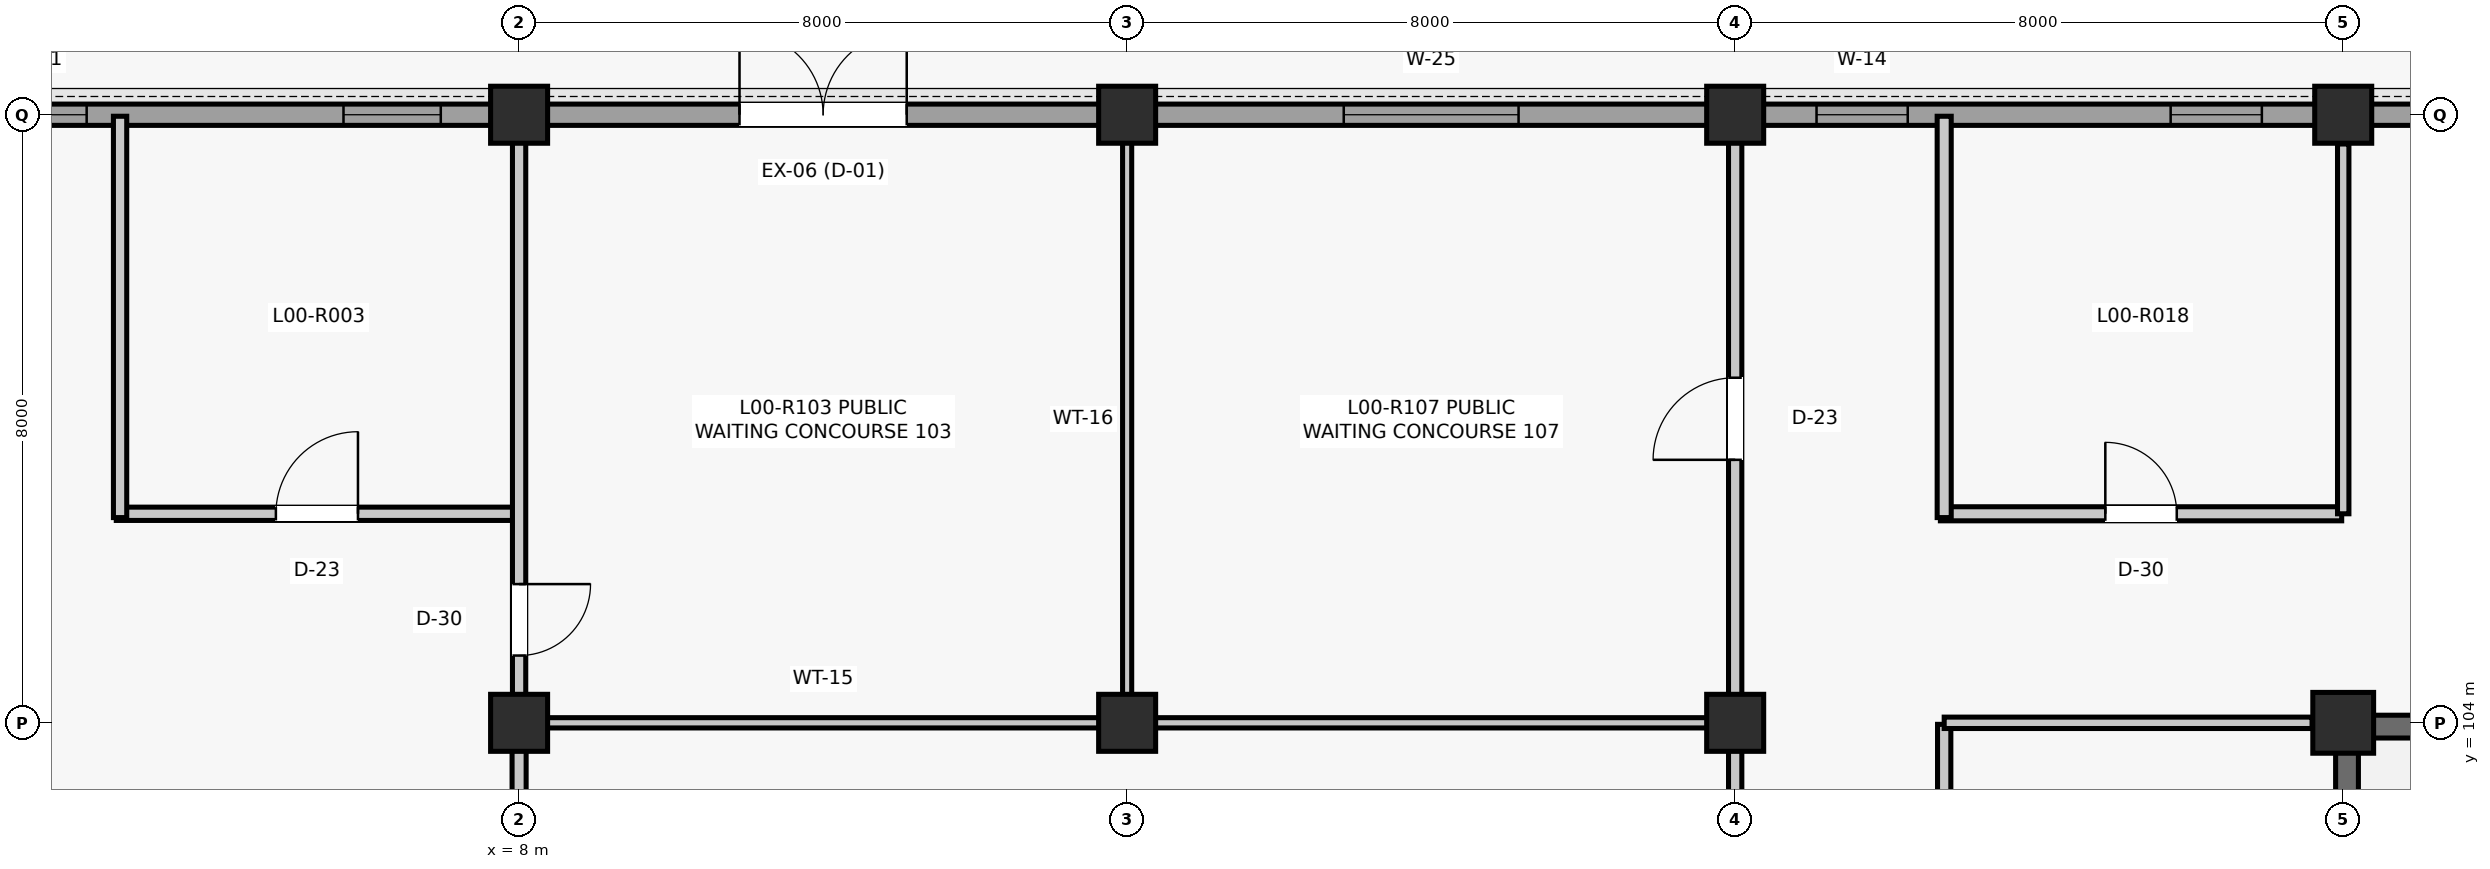
"""IFC4 building model, lengths in metres.
Left out: names, types, materials, properties, quantities, classifications, styles, units other than length and angle.
Written with IfcOpenShell. Run it as: python <this file> out.ifc"""

import sys

from ifc_helpers import new_model, si_unit, direction, frame, frame_2d, origin, origin_2d, place, context, subcontext, project, spatial, rectangle, extrude, element, fill, save


model = new_model("IFC4")
c1 = context("Model", 3, precision=1e-05, world=origin(), true_north=direction((0.0, 1.0)))
c2 = subcontext(c1, "Body", "Model", "MODEL_VIEW")
j1 = project(units=[si_unit("LENGTHUNIT", "METRE"), si_unit("PLANEANGLEUNIT", "RADIAN")], contexts=[c1])
p1 = place(None, origin())
s1 = spatial("IfcSite", under=j1, at=p1, CompositionType="ELEMENT")
p2 = place(p1, origin())
s2 = spatial("IfcBuilding", under=s1, at=p2, CompositionType="ELEMENT")
p3 = place(p2, origin())
s3 = spatial("IfcBuildingStorey", under=s2, at=p3, CompositionType="ELEMENT", Elevation=0.0)
for number, where, z_axis, x_axis in (
    (1, (8.0, 104.0, 0.0), (0.0, 0.0, 1.0), (1.0, 0.0, 0.0)),
    (2, (8.0, 112.0, 0.0), (0.0, 0.0, 1.0), (1.0, 0.0, 0.0)),
    (3, (16.0, 104.0, 0.0), (0.0, 0.0, 1.0), (1.0, 0.0, 0.0)),
    (4, (16.0, 112.0, 0.0), (0.0, 0.0, 1.0), (1.0, 0.0, 0.0)),
    (5, (24.0, 104.0, 0.0), (0.0, 0.0, 1.0), (1.0, 0.0, 0.0)),
    (6, (24.0, 112.0, 0.0), (0.0, 0.0, 1.0), (1.0, 0.0, 0.0)),
):
    element("IfcColumn", number, at=place(p3, frame(where, z_axis=z_axis, x_axis=x_axis)), inside=s3, PredefinedType="COLUMN", context=c2, shape_type="SweptSolid", body=[
        extrude(rectangle(XDim=0.75, YDim=0.75, at=origin_2d()), origin(), (0.0, 0.0, 1.0), 5.28),
    ])
p4 = place(p3, frame((32.0, 104.0, 0.0), z_axis=(0.0, 0.0, 1.0), x_axis=(1.0, 0.0, 0.0)))
e7 = element("IfcColumn", 7, at=p4, inside=s3, PredefinedType="COLUMN", context=c2, shape_type="SweptSolid", body=[
    extrude(rectangle(XDim=0.8, YDim=0.8, at=origin_2d()), origin(), (0.0, 0.0, 1.0), 5.28),
])
p5 = place(p3, frame((32.0, 112.0, 0.0), z_axis=(0.0, 0.0, 1.0), x_axis=(1.0, 0.0, 0.0)))
e8 = element("IfcColumn", 8, at=p5, inside=s3, PredefinedType="COLUMN", context=c2, shape_type="SweptSolid", body=[
    extrude(rectangle(XDim=0.75, YDim=0.75, at=origin_2d()), origin(), (0.0, 0.0, 1.0), 5.28),
])
p6 = place(p3, frame((0.36, 112.0, 0.0), z_axis=(0.0, 0.0, 1.0), x_axis=(1.0, 0.0, 0.0)))
e9 = element("IfcWall", 9, at=p6, inside=s3, PredefinedType="SOLIDWALL", context=c2, shape_type="SweptSolid", body=[
    extrude(rectangle(XDim=7.28, YDim=0.28, at=frame_2d((3.64, 0.0))), origin(), (0.0, 0.0, 1.0), 4.614),
])
p7 = place(p6, frame((0.67, 0.0, 0.95)))
e10 = element("IfcOpeningElement", 10, at=p7, cuts=e9, PredefinedType="OPENING", context=c2, shape_type="SweptSolid", body=[
    extrude(rectangle(XDim=1.28, YDim=1.72, at=frame_2d((0.64, 0.86))), frame((0.0, 0.15, 0.0), z_axis=(0.0, -1.0, 0.0), x_axis=(1.0, 0.0, 0.0)), (0.0, 0.0, 1.0), 0.3),
])
p8 = place(p6, frame((5.33, 0.0, 0.95)))
e11 = element("IfcOpeningElement", 11, at=p8, cuts=e9, PredefinedType="OPENING", context=c2, shape_type="SweptSolid", body=[
    extrude(rectangle(XDim=1.28, YDim=1.72, at=frame_2d((0.64, 0.86))), frame((0.0, 0.15, 0.0), z_axis=(0.0, -1.0, 0.0), x_axis=(1.0, 0.0, 0.0)), (0.0, 0.0, 1.0), 0.3),
])
p9 = place(p3, frame((8.36, 112.0, 0.0), z_axis=(0.0, 0.0, 1.0), x_axis=(1.0, 0.0, 0.0)))
e12 = element("IfcWall", 12, at=p9, inside=s3, PredefinedType="SOLIDWALL", context=c2, shape_type="SweptSolid", body=[
    extrude(rectangle(XDim=7.28, YDim=0.28, at=frame_2d((3.64, 0.0))), origin(), (0.0, 0.0, 1.0), 4.677),
])
p10 = place(p9, frame((2.54, 0.0, 0.0)))
e13 = element("IfcOpeningElement", 13, at=p10, cuts=e12, PredefinedType="OPENING", context=c2, shape_type="SweptSolid", body=[
    extrude(rectangle(XDim=2.2, YDim=2.5, at=frame_2d((1.1, 1.25))), frame((0.0, 0.15, 0.0), z_axis=(0.0, -1.0, 0.0), x_axis=(1.0, 0.0, 0.0)), (0.0, 0.0, 1.0), 0.3),
])
p11 = place(p3, frame((16.36, 112.0, 0.0), z_axis=(0.0, 0.0, 1.0), x_axis=(1.0, 0.0, 0.0)))
e14 = element("IfcWall", 14, at=p11, inside=s3, PredefinedType="SOLIDWALL", context=c2, shape_type="SweptSolid", body=[
    extrude(rectangle(XDim=7.28, YDim=0.28, at=frame_2d((3.64, 0.0))), origin(), (0.0, 0.0, 1.0), 4.61),
])
p12 = place(p11, frame((2.49, 0.0, 0.9)))
e15 = element("IfcOpeningElement", 15, at=p12, cuts=e14, PredefinedType="OPENING", context=c2, shape_type="SweptSolid", body=[
    extrude(rectangle(XDim=2.3, YDim=2.55, at=frame_2d((1.15, 1.275))), frame((0.0, 0.15, 0.0), z_axis=(0.0, -1.0, 0.0), x_axis=(1.0, 0.0, 0.0)), (0.0, 0.0, 1.0), 0.3),
])
p13 = place(p3, frame((24.36, 112.0, 0.0), z_axis=(0.0, 0.0, 1.0), x_axis=(1.0, 0.0, 0.0)))
e16 = element("IfcWall", 16, at=p13, inside=s3, PredefinedType="SOLIDWALL", context=c2, shape_type="SweptSolid", body=[
    extrude(rectangle(XDim=7.28, YDim=0.28, at=frame_2d((3.64, 0.0))), origin(), (0.0, 0.0, 1.0), 4.674),
])
p14 = place(p13, frame((0.71, 0.0, 0.95)))
e17 = element("IfcOpeningElement", 17, at=p14, cuts=e16, PredefinedType="OPENING", context=c2, shape_type="SweptSolid", body=[
    extrude(rectangle(XDim=1.2, YDim=1.8, at=frame_2d((0.6, 0.9))), frame((0.0, 0.15, 0.0), z_axis=(0.0, -1.0, 0.0), x_axis=(1.0, 0.0, 0.0)), (0.0, 0.0, 1.0), 0.3),
])
p15 = place(p13, frame((5.37, 0.0, 0.95)))
e18 = element("IfcOpeningElement", 18, at=p15, cuts=e16, PredefinedType="OPENING", context=c2, shape_type="SweptSolid", body=[
    extrude(rectangle(XDim=1.2, YDim=1.8, at=frame_2d((0.6, 0.9))), frame((0.0, 0.15, 0.0), z_axis=(0.0, -1.0, 0.0), x_axis=(1.0, 0.0, 0.0)), (0.0, 0.0, 1.0), 0.3),
])
p16 = place(p3, frame((32.36, 112.0, 0.0), z_axis=(0.0, 0.0, 1.0), x_axis=(1.0, 0.0, 0.0)))
e19 = element("IfcWall", 19, at=p16, inside=s3, PredefinedType="SOLIDWALL", context=c2, shape_type="SweptSolid", body=[
    extrude(rectangle(XDim=7.28, YDim=0.28, at=frame_2d((3.64, 0.0))), origin(), (0.0, 0.0, 1.0), 4.614),
])
p17 = place(p16, frame((2.54, 0.0, 0.0)))
e20 = element("IfcOpeningElement", 20, at=p17, cuts=e19, PredefinedType="OPENING", context=c2, shape_type="SweptSolid", body=[
    extrude(rectangle(XDim=2.2, YDim=2.5, at=frame_2d((1.1, 1.25))), frame((0.0, 0.15, 0.0), z_axis=(0.0, -1.0, 0.0), x_axis=(1.0, 0.0, 0.0)), (0.0, 0.0, 1.0), 0.3),
])
for number, where, z_axis, x_axis in (
    (21, (32.05, 96.29, 0.0), (0.0, 0.0, 1.0), (0.0, 1.0, 0.0)),
    (22, (32.29, 103.95, 0.0), (0.0, 0.0, 1.0), (1.0, 0.0, 0.0)),
):
    element("IfcWall", number, at=place(p3, frame(where, z_axis=z_axis, x_axis=x_axis)), inside=s3, PredefinedType="SHEAR", context=c2, shape_type="SweptSolid", body=[
        extrude(rectangle(XDim=7.42, YDim=0.3, at=frame_2d((3.71, 0.0))), origin(), (0.0, 0.0, 1.0), 5.035),
    ])
p18 = place(p3, frame((2.7, 106.75, 0.0), z_axis=(0.0, 0.0, 1.0), x_axis=(1.0, 0.0, 0.0)))
e23 = element("IfcWall", 23, at=p18, inside=s3, PredefinedType="PARTITIONING", context=c2, shape_type="SweptSolid", body=[
    extrude(rectangle(XDim=5.28, YDim=0.175, at=frame_2d((2.64, 0.0))), origin(), (0.0, 0.0, 1.0), 4.404),
])
p19 = place(p18, frame((2.1, 0.0, 0.0)))
e24 = element("IfcOpeningElement", 24, at=p19, cuts=e23, PredefinedType="OPENING", context=c2, shape_type="SweptSolid", body=[
    extrude(rectangle(XDim=1.08, YDim=2.2, at=frame_2d((0.54, 1.1))), frame((0.0, 0.097, 0.0), z_axis=(0.0, -1.0, 0.0), x_axis=(1.0, 0.0, 0.0)), (0.0, 0.0, 1.0), 0.195),
])
p20 = place(p3, frame((2.75, 106.7, 0.0), z_axis=(0.0, 0.0, 1.0), x_axis=(0.0, 1.0, 0.0)))
e25 = element("IfcWall", 25, at=p20, inside=s3, PredefinedType="PARTITIONING", context=c2, shape_type="SweptSolid", body=[
    extrude(rectangle(XDim=5.28, YDim=0.175, at=frame_2d((2.64, 0.0))), origin(), (0.0, 0.0, 1.0), 4.607),
])
p21 = place(p3, frame((26.75, 96.02, 0.0), z_axis=(0.0, 0.0, 1.0), x_axis=(0.0, 1.0, 0.0)))
e26 = element("IfcWall", 26, at=p21, inside=s3, PredefinedType="PARTITIONING", context=c2, shape_type="SweptSolid", body=[
    extrude(rectangle(XDim=7.96, YDim=0.175, at=frame_2d((3.98, 0.0))), origin(), (0.0, 0.0, 1.0), 4.327),
])
p22 = place(p21, frame((3.355, 0.0, 0.0)))
e27 = element("IfcOpeningElement", 27, at=p22, cuts=e26, PredefinedType="OPENING", context=c2, shape_type="SweptSolid", body=[
    extrude(rectangle(XDim=1.25, YDim=2.18, at=frame_2d((0.625, 1.09))), frame((0.0, 0.097, 0.0), z_axis=(0.0, -1.0, 0.0), x_axis=(1.0, 0.0, 0.0)), (0.0, 0.0, 1.0), 0.195),
])
p23 = place(p3, frame((26.75, 104.0, 0.0), z_axis=(0.0, 0.0, 1.0), x_axis=(1.0, 0.0, 0.0)))
e28 = element("IfcWall", 28, at=p23, inside=s3, PredefinedType="PARTITIONING", context=c2, shape_type="SweptSolid", body=[
    extrude(rectangle(XDim=4.84, YDim=0.15, at=frame_2d((2.42, 0.0))), origin(), (0.0, 0.0, 1.0), 4.327),
])
p24 = place(p3, frame((26.7, 106.75, 0.0), z_axis=(0.0, 0.0, 1.0), x_axis=(1.0, 0.0, 0.0)))
e29 = element("IfcWall", 29, at=p24, inside=s3, PredefinedType="PARTITIONING", context=c2, shape_type="SweptSolid", body=[
    extrude(rectangle(XDim=5.28, YDim=0.185, at=frame_2d((2.64, 0.0))), origin(), (0.0, 0.0, 1.0), 4.412),
])
p25 = place(p24, frame((2.17, 0.0, 0.0)))
e30 = element("IfcOpeningElement", 30, at=p25, cuts=e29, PredefinedType="OPENING", context=c2, shape_type="SweptSolid", body=[
    extrude(rectangle(XDim=0.94, YDim=2.12, at=frame_2d((0.47, 1.06))), frame((0.0, 0.103, 0.0), z_axis=(0.0, -1.0, 0.0), x_axis=(1.0, 0.0, 0.0)), (0.0, 0.0, 1.0), 0.205),
])
p26 = place(p3, frame((26.75, 106.7, 0.0), z_axis=(0.0, 0.0, 1.0), x_axis=(0.0, 1.0, 0.0)))
e31 = element("IfcWall", 31, at=p26, inside=s3, PredefinedType="PARTITIONING", context=c2, shape_type="SweptSolid", body=[
    extrude(rectangle(XDim=5.28, YDim=0.185, at=frame_2d((2.64, 0.0))), origin(), (0.0, 0.0, 1.0), 4.667),
])
p27 = place(p3, frame((32.0, 106.75, 0.0), z_axis=(0.0, 0.0, 1.0), x_axis=(0.0, 1.0, 0.0)))
e32 = element("IfcWall", 32, at=p27, inside=s3, PredefinedType="PARTITIONING", context=c2, shape_type="SweptSolid", body=[
    extrude(rectangle(XDim=4.865, YDim=0.15, at=frame_2d((2.433, 0.0))), origin(), (0.0, 0.0, 1.0), 4.412),
])
p28 = place(p3, frame((8.0, 96.39, 0.0), z_axis=(0.0, 0.0, 1.0), x_axis=(0.0, 1.0, 0.0)))
e33 = element("IfcWall", 33, at=p28, inside=s3, PredefinedType="PARTITIONING", context=c2, shape_type="SweptSolid", body=[
    extrude(rectangle(XDim=7.245, YDim=0.185, at=frame_2d((3.623, 0.0))), origin(), (0.0, 0.0, 1.0), 4.412),
])
p29 = place(p28, frame((2.972, 0.0, 0.0)))
e34 = element("IfcOpeningElement", 34, at=p29, cuts=e33, PredefinedType="OPENING", context=c2, shape_type="SweptSolid", body=[
    extrude(rectangle(XDim=1.3, YDim=2.2, at=frame_2d((0.65, 1.1))), frame((0.0, 0.103, 0.0), z_axis=(0.0, -1.0, 0.0), x_axis=(1.0, 0.0, 0.0)), (0.0, 0.0, 1.0), 0.205),
])
p30 = place(p3, frame((8.0, 104.365, 0.0), z_axis=(0.0, 0.0, 1.0), x_axis=(0.0, 1.0, 0.0)))
e35 = element("IfcWall", 35, at=p30, inside=s3, PredefinedType="PARTITIONING", context=c2, shape_type="SweptSolid", body=[
    extrude(rectangle(XDim=7.27, YDim=0.175, at=frame_2d((3.635, 0.0))), origin(), (0.0, 0.0, 1.0), 4.404),
])
p31 = place(p30, frame((0.52, 0.0, 0.0)))
e36 = element("IfcOpeningElement", 36, at=p31, cuts=e35, PredefinedType="OPENING", context=c2, shape_type="SweptSolid", body=[
    extrude(rectangle(XDim=0.94, YDim=2.12, at=frame_2d((0.47, 1.06))), frame((0.0, 0.097, 0.0), z_axis=(0.0, -1.0, 0.0), x_axis=(1.0, 0.0, 0.0)), (0.0, 0.0, 1.0), 0.195),
])
p32 = place(p3, frame((8.365, 104.0, 0.0), z_axis=(0.0, 0.0, 1.0), x_axis=(1.0, 0.0, 0.0)))
e37 = element("IfcWall", 37, at=p32, inside=s3, PredefinedType="PARTITIONING", context=c2, shape_type="SweptSolid", body=[
    extrude(rectangle(XDim=7.27, YDim=0.135, at=frame_2d((3.635, 0.0))), origin(), (0.0, 0.0, 1.0), 4.336),
])
p33 = place(p3, frame((16.0, 104.365, 0.0), z_axis=(0.0, 0.0, 1.0), x_axis=(0.0, 1.0, 0.0)))
e38 = element("IfcWall", 38, at=p33, inside=s3, PredefinedType="PARTITIONING", context=c2, shape_type="SweptSolid", body=[
    extrude(rectangle(XDim=7.27, YDim=0.12, at=frame_2d((3.635, 0.0))), origin(), (0.0, 0.0, 1.0), 4.471),
])
p34 = place(p3, frame((24.0, 96.365, 0.0), z_axis=(0.0, 0.0, 1.0), x_axis=(0.0, 1.0, 0.0)))
e39 = element("IfcWall", 39, at=p34, inside=s3, PredefinedType="PARTITIONING", context=c2, shape_type="SweptSolid", body=[
    extrude(rectangle(XDim=7.27, YDim=0.175, at=frame_2d((3.635, 0.0))), origin(), (0.0, 0.0, 1.0), 4.471),
])
p35 = place(p34, frame((2.685, 0.0, 0.0)))
e40 = element("IfcOpeningElement", 40, at=p35, cuts=e39, PredefinedType="OPENING", context=c2, shape_type="SweptSolid", body=[
    extrude(rectangle(XDim=1.9, YDim=2.38, at=frame_2d((0.95, 1.19))), frame((0.0, 0.097, 0.0), z_axis=(0.0, -1.0, 0.0), x_axis=(1.0, 0.0, 0.0)), (0.0, 0.0, 1.0), 0.195),
])
p36 = place(p3, frame((16.365, 104.0, 0.0), z_axis=(0.0, 0.0, 1.0), x_axis=(1.0, 0.0, 0.0)))
e41 = element("IfcWall", 41, at=p36, inside=s3, PredefinedType="PARTITIONING", context=c2, shape_type="SweptSolid", body=[
    extrude(rectangle(XDim=7.27, YDim=0.135, at=frame_2d((3.635, 0.0))), origin(), (0.0, 0.0, 1.0), 4.404),
])
p37 = place(p3, frame((24.0, 104.365, 0.0), z_axis=(0.0, 0.0, 1.0), x_axis=(0.0, 1.0, 0.0)))
e42 = element("IfcWall", 42, at=p37, inside=s3, PredefinedType="PARTITIONING", context=c2, shape_type="SweptSolid", body=[
    extrude(rectangle(XDim=7.27, YDim=0.175, at=frame_2d((3.635, 0.0))), origin(), (0.0, 0.0, 1.0), 4.403),
])
p38 = place(p37, frame((3.095, 0.0, 0.0)))
e43 = element("IfcOpeningElement", 43, at=p38, cuts=e42, PredefinedType="OPENING", context=c2, shape_type="SweptSolid", body=[
    extrude(rectangle(XDim=1.08, YDim=2.2, at=frame_2d((0.54, 1.1))), frame((0.0, 0.097, 0.0), z_axis=(0.0, -1.0, 0.0), x_axis=(1.0, 0.0, 0.0)), (0.0, 0.0, 1.0), 0.195),
])
p39 = place(p7, origin())
e44 = element("IfcWindow", 44, at=p39, inside=s3, PartitioningType="SINGLE_PANEL", PredefinedType="WINDOW", context=c2, shape_type="SweptSolid", body=[
    extrude(rectangle(XDim=1.28, YDim=1.72, at=frame_2d((0.64, 0.86))), frame((0.0, 0.03, 0.0), z_axis=(0.0, -1.0, 0.0), x_axis=(1.0, 0.0, 0.0)), (0.0, 0.0, 1.0), 0.06),
])
fill(e10, e44)
p40 = place(p8, origin())
e45 = element("IfcWindow", 45, at=p40, inside=s3, PartitioningType="SINGLE_PANEL", PredefinedType="WINDOW", context=c2, shape_type="SweptSolid", body=[
    extrude(rectangle(XDim=1.28, YDim=1.72, at=frame_2d((0.64, 0.86))), frame((0.0, 0.03, 0.0), z_axis=(0.0, -1.0, 0.0), x_axis=(1.0, 0.0, 0.0)), (0.0, 0.0, 1.0), 0.06),
])
fill(e11, e45)
p41 = place(p10, origin())
e46 = element("IfcDoor", 46, at=p41, inside=s3, OperationType="DOUBLE_DOOR_SINGLE_SWING", PredefinedType="DOOR", context=c2, shape_type="SweptSolid", body=[
    extrude(rectangle(XDim=2.2, YDim=2.5, at=frame_2d((1.1, 1.25))), frame((0.0, 0.025, 0.0), z_axis=(0.0, -1.0, 0.0), x_axis=(1.0, 0.0, 0.0)), (0.0, 0.0, 1.0), 0.05),
])
fill(e13, e46)
p42 = place(p12, origin())
e47 = element("IfcWindow", 47, at=p42, inside=s3, PartitioningType="SINGLE_PANEL", PredefinedType="WINDOW", context=c2, shape_type="SweptSolid", body=[
    extrude(rectangle(XDim=2.3, YDim=2.55, at=frame_2d((1.15, 1.275))), frame((0.0, 0.03, 0.0), z_axis=(0.0, -1.0, 0.0), x_axis=(1.0, 0.0, 0.0)), (0.0, 0.0, 1.0), 0.06),
])
fill(e15, e47)
p43 = place(p14, origin())
e48 = element("IfcWindow", 48, at=p43, inside=s3, PartitioningType="SINGLE_PANEL", PredefinedType="WINDOW", context=c2, shape_type="SweptSolid", body=[
    extrude(rectangle(XDim=1.2, YDim=1.8, at=frame_2d((0.6, 0.9))), frame((0.0, 0.03, 0.0), z_axis=(0.0, -1.0, 0.0), x_axis=(1.0, 0.0, 0.0)), (0.0, 0.0, 1.0), 0.06),
])
fill(e17, e48)
p44 = place(p15, origin())
e49 = element("IfcWindow", 49, at=p44, inside=s3, PartitioningType="SINGLE_PANEL", PredefinedType="WINDOW", context=c2, shape_type="SweptSolid", body=[
    extrude(rectangle(XDim=1.2, YDim=1.8, at=frame_2d((0.6, 0.9))), frame((0.0, 0.03, 0.0), z_axis=(0.0, -1.0, 0.0), x_axis=(1.0, 0.0, 0.0)), (0.0, 0.0, 1.0), 0.06),
])
fill(e18, e49)
p45 = place(p19, origin())
e50 = element("IfcDoor", 50, at=p45, inside=s3, OperationType="SINGLE_SWING_RIGHT", PredefinedType="DOOR", context=c2, shape_type="SweptSolid", body=[
    extrude(rectangle(XDim=1.08, YDim=2.2, at=frame_2d((0.54, 1.1))), frame((0.0, 0.025, 0.0), z_axis=(0.0, -1.0, 0.0), x_axis=(1.0, 0.0, 0.0)), (0.0, 0.0, 1.0), 0.05),
])
fill(e24, e50)
p46 = place(p25, origin())
e51 = element("IfcDoor", 51, at=p46, inside=s3, OperationType="SINGLE_SWING_LEFT", PredefinedType="DOOR", context=c2, shape_type="SweptSolid", body=[
    extrude(rectangle(XDim=0.94, YDim=2.12, at=frame_2d((0.47, 1.06))), frame((0.0, 0.025, 0.0), z_axis=(0.0, -1.0, 0.0), x_axis=(1.0, 0.0, 0.0)), (0.0, 0.0, 1.0), 0.05),
])
fill(e30, e51)
p47 = place(p31, frame((0.94, 0.0, 0.0), z_axis=(0.0, 0.0, 1.0), x_axis=(-1.0, 0.0, 0.0)))
e52 = element("IfcDoor", 52, at=p47, inside=s3, OperationType="SINGLE_SWING_RIGHT", PredefinedType="DOOR", context=c2, shape_type="SweptSolid", body=[
    extrude(rectangle(XDim=0.94, YDim=2.12, at=frame_2d((0.47, 1.06))), frame((0.0, 0.025, 0.0), z_axis=(0.0, -1.0, 0.0), x_axis=(1.0, 0.0, 0.0)), (0.0, 0.0, 1.0), 0.05),
])
fill(e36, e52)
p48 = place(p38, origin())
e53 = element("IfcDoor", 53, at=p48, inside=s3, OperationType="SINGLE_SWING_LEFT", PredefinedType="DOOR", context=c2, shape_type="SweptSolid", body=[
    extrude(rectangle(XDim=1.08, YDim=2.2, at=frame_2d((0.54, 1.1))), frame((0.0, 0.025, 0.0), z_axis=(0.0, -1.0, 0.0), x_axis=(1.0, 0.0, 0.0)), (0.0, 0.0, 1.0), 0.05),
])
fill(e43, e53)
save(model, sys.argv[1])
